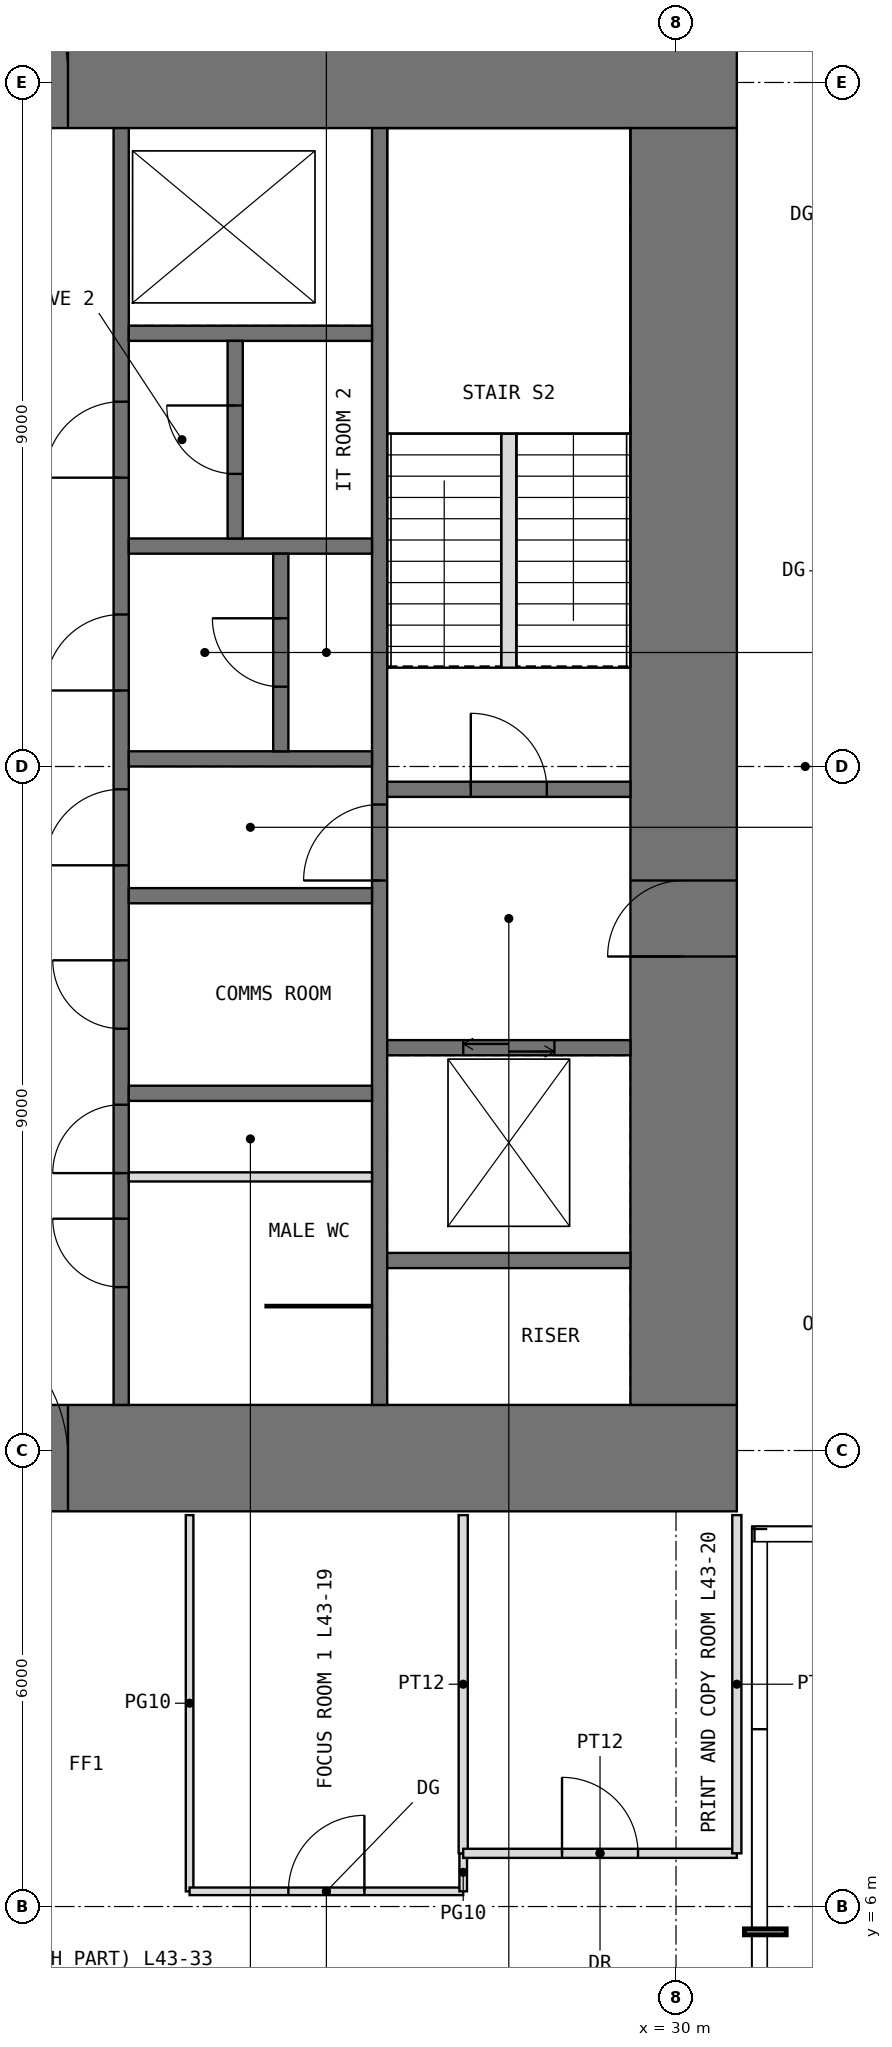
"""IFC4 building model, lengths in metres.
Left out: names, types, materials, properties, quantities, classifications, styles, units other than length and angle.
Written with IfcOpenShell. Run it as: python <this file> out.ifc"""

import sys

from ifc_helpers import new_model, si_unit, direction, frame, frame_2d, origin, place, context, subcontext, project, spatial, rectangle, extrude, element, fill, save


model = new_model("IFC4")
c1 = context("Model", 3, precision=1e-05, world=origin(), true_north=direction((0.0, 1.0)))
c2 = subcontext(c1, "Body", "Model", "MODEL_VIEW")
j1 = project(units=[si_unit("LENGTHUNIT", "METRE"), si_unit("PLANEANGLEUNIT", "RADIAN")], contexts=[c1])
p1 = place(None, origin())
s1 = spatial("IfcSite", under=j1, at=p1, CompositionType="ELEMENT")
p2 = place(p1, origin())
s2 = spatial("IfcBuilding", under=s1, at=p2, CompositionType="ELEMENT")
p3 = place(p2, frame((0.0, 0.0, 182.5)))
s3 = spatial("IfcBuildingStorey", under=s2, at=p3, CompositionType="ELEMENT", Elevation=182.5)
p4 = place(p3, frame((11.2, 11.9, -0.05), z_axis=(0.0, 0.0, 1.0), x_axis=(1.0, 0.0, 0.0)))
e1 = element("IfcWall", 1, at=p4, inside=s3, PredefinedType="SHEAR", context=c2, shape_type="SweptSolid", body=[
    extrude(rectangle(XDim=19.6, YDim=1.4, at=frame_2d((9.8, 0.0))), origin(), (0.0, 0.0, 1.0), 4.0),
])
p5 = place(p4, frame((8.8, 0.0, 0.05)))
e2 = element("IfcOpeningElement", 2, at=p5, cuts=e1, PredefinedType="OPENING", context=c2, shape_type="SweptSolid", body=[
    extrude(rectangle(XDim=2.0, YDim=2.2, at=frame_2d((1.0, 1.1))), frame((0.0, 0.71, 0.0), z_axis=(0.0, -1.0, 0.0), x_axis=(1.0, 0.0, 0.0)), (0.0, 0.0, 1.0), 1.42),
])
p6 = place(p3, frame((11.2, 30.1, -0.05), z_axis=(0.0, 0.0, 1.0), x_axis=(1.0, 0.0, 0.0)))
e3 = element("IfcWall", 3, at=p6, inside=s3, PredefinedType="SHEAR", context=c2, shape_type="SweptSolid", body=[
    extrude(rectangle(XDim=19.6, YDim=1.4, at=frame_2d((9.8, 0.0))), origin(), (0.0, 0.0, 1.0), 4.0),
])
p7 = place(p6, frame((8.8, 0.0, 0.05)))
e4 = element("IfcOpeningElement", 4, at=p7, cuts=e3, PredefinedType="OPENING", context=c2, shape_type="SweptSolid", body=[
    extrude(rectangle(XDim=2.0, YDim=2.2, at=frame_2d((1.0, 1.1))), frame((0.0, 0.71, 0.0), z_axis=(0.0, -1.0, 0.0), x_axis=(1.0, 0.0, 0.0)), (0.0, 0.0, 1.0), 1.42),
])
p8 = place(p3, frame((30.1, 12.6, -0.05), z_axis=(0.0, 0.0, 1.0), x_axis=(0.0, 1.0, 0.0)))
e5 = element("IfcWall", 5, at=p8, inside=s3, PredefinedType="SHEAR", context=c2, shape_type="SweptSolid", body=[
    extrude(rectangle(XDim=16.8, YDim=1.4, at=frame_2d((8.4, 0.0))), origin(), (0.0, 0.0, 1.0), 4.0),
])
p9 = place(p8, frame((5.9, 0.0, 0.05)))
e6 = element("IfcOpeningElement", 6, at=p9, cuts=e5, PredefinedType="OPENING", context=c2, shape_type="SweptSolid", body=[
    extrude(rectangle(XDim=1.0, YDim=2.2, at=frame_2d((0.5, 1.1))), frame((0.0, 0.71, 0.0), z_axis=(0.0, -1.0, 0.0), x_axis=(1.0, 0.0, 0.0)), (0.0, 0.0, 1.0), 1.42),
])
p10 = place(p3, frame((22.7, 12.6, -0.05), z_axis=(0.0, 0.0, 1.0), x_axis=(0.0, 1.0, 0.0)))
e7 = element("IfcWall", 7, at=p10, inside=s3, PredefinedType="SHEAR", context=c2, shape_type="SweptSolid", body=[
    extrude(rectangle(XDim=16.8, YDim=0.2, at=frame_2d((8.4, 0.0))), origin(), (0.0, 0.0, 1.0), 4.0),
])
p11 = place(p10, frame((3.05, 0.0, 0.05)))
e8 = element("IfcOpeningElement", 8, at=p11, cuts=e7, PredefinedType="OPENING", context=c2, shape_type="SweptSolid", body=[
    extrude(rectangle(XDim=0.9, YDim=2.2, at=frame_2d((0.45, 1.1))), frame((0.0, 0.11, 0.0), z_axis=(0.0, -1.0, 0.0), x_axis=(1.0, 0.0, 0.0)), (0.0, 0.0, 1.0), 0.22),
])
p12 = place(p10, frame((7.1, 0.0, 0.05)))
e9 = element("IfcOpeningElement", 9, at=p12, cuts=e7, PredefinedType="OPENING", context=c2, shape_type="SweptSolid", body=[
    extrude(rectangle(XDim=1.0, YDim=2.2, at=frame_2d((0.5, 1.1))), frame((0.0, 0.11, 0.0), z_axis=(0.0, -1.0, 0.0), x_axis=(1.0, 0.0, 0.0)), (0.0, 0.0, 1.0), 0.22),
])
p13 = place(p10, frame((1.55, 0.0, 0.05)))
e10 = element("IfcOpeningElement", 10, at=p13, cuts=e7, PredefinedType="OPENING", context=c2, shape_type="SweptSolid", body=[
    extrude(rectangle(XDim=0.9, YDim=2.2, at=frame_2d((0.45, 1.1))), frame((0.0, 0.11, 0.0), z_axis=(0.0, -1.0, 0.0), x_axis=(1.0, 0.0, 0.0)), (0.0, 0.0, 1.0), 0.22),
])
p14 = place(p10, frame((4.95, 0.0, 0.05)))
e11 = element("IfcOpeningElement", 11, at=p14, cuts=e7, PredefinedType="OPENING", context=c2, shape_type="SweptSolid", body=[
    extrude(rectangle(XDim=0.9, YDim=2.2, at=frame_2d((0.45, 1.1))), frame((0.0, 0.11, 0.0), z_axis=(0.0, -1.0, 0.0), x_axis=(1.0, 0.0, 0.0)), (0.0, 0.0, 1.0), 0.22),
])
p15 = place(p10, frame((9.4, 0.0, 0.05)))
e12 = element("IfcOpeningElement", 12, at=p15, cuts=e7, PredefinedType="OPENING", context=c2, shape_type="SweptSolid", body=[
    extrude(rectangle(XDim=1.0, YDim=2.2, at=frame_2d((0.5, 1.1))), frame((0.0, 0.11, 0.0), z_axis=(0.0, -1.0, 0.0), x_axis=(1.0, 0.0, 0.0)), (0.0, 0.0, 1.0), 0.22),
])
p16 = place(p10, frame((12.2, 0.0, 0.05)))
e13 = element("IfcOpeningElement", 13, at=p16, cuts=e7, PredefinedType="OPENING", context=c2, shape_type="SweptSolid", body=[
    extrude(rectangle(XDim=1.0, YDim=2.2, at=frame_2d((0.5, 1.1))), frame((0.0, 0.11, 0.0), z_axis=(0.0, -1.0, 0.0), x_axis=(1.0, 0.0, 0.0)), (0.0, 0.0, 1.0), 0.22),
])
p17 = place(p3, frame((26.1, 12.6, -0.05), z_axis=(0.0, 0.0, 1.0), x_axis=(0.0, 1.0, 0.0)))
e14 = element("IfcWall", 14, at=p17, inside=s3, PredefinedType="SHEAR", context=c2, shape_type="SweptSolid", body=[
    extrude(rectangle(XDim=16.8, YDim=0.2, at=frame_2d((8.4, 0.0))), origin(), (0.0, 0.0, 1.0), 4.0),
])
p18 = place(p17, frame((6.9, 0.0, 0.05)))
e15 = element("IfcOpeningElement", 15, at=p18, cuts=e14, PredefinedType="OPENING", context=c2, shape_type="SweptSolid", body=[
    extrude(rectangle(XDim=1.0, YDim=2.2, at=frame_2d((0.5, 1.1))), frame((0.0, 0.11, 0.0), z_axis=(0.0, -1.0, 0.0), x_axis=(1.0, 0.0, 0.0)), (0.0, 0.0, 1.0), 0.22),
])
for number, where, z_axis, x_axis in (
    (16, (22.8, 16.7, -0.05), (0.0, 0.0, 1.0), (1.0, 0.0, 0.0)),
    (17, (22.8, 19.3, -0.05), (0.0, 0.0, 1.0), (1.0, 0.0, 0.0)),
    (18, (22.8, 21.1, -0.05), (0.0, 0.0, 1.0), (1.0, 0.0, 0.0)),
    (19, (22.8, 23.9, -0.05), (0.0, 0.0, 1.0), (1.0, 0.0, 0.0)),
    (20, (22.8, 26.7, -0.05), (0.0, 0.0, 1.0), (1.0, 0.0, 0.0)),
    (21, (26.2, 14.5, -0.05), (0.0, 0.0, 1.0), (1.0, 0.0, 0.0)),
):
    element("IfcWall", number, at=place(p3, frame(where, z_axis=z_axis, x_axis=x_axis)), inside=s3, PredefinedType="SHEAR", context=c2, shape_type="SweptSolid", body=[
        extrude(rectangle(XDim=3.2, YDim=0.2, at=frame_2d((1.6, 0.0))), origin(), (0.0, 0.0, 1.0), 4.0),
    ])
p19 = place(p3, frame((26.2, 17.3, -0.05), z_axis=(0.0, 0.0, 1.0), x_axis=(1.0, 0.0, 0.0)))
e22 = element("IfcWall", 22, at=p19, inside=s3, PredefinedType="SHEAR", context=c2, shape_type="SweptSolid", body=[
    extrude(rectangle(XDim=3.2, YDim=0.2, at=frame_2d((1.6, 0.0))), origin(), (0.0, 0.0, 1.0), 4.0),
])
p20 = place(p19, frame((1.0, 0.0, 0.05)))
e23 = element("IfcOpeningElement", 23, at=p20, cuts=e22, PredefinedType="OPENING", context=c2, shape_type="SweptSolid", body=[
    extrude(rectangle(XDim=1.2, YDim=2.2, at=frame_2d((0.6, 1.1))), frame((0.0, 0.11, 0.0), z_axis=(0.0, -1.0, 0.0), x_axis=(1.0, 0.0, 0.0)), (0.0, 0.0, 1.0), 0.22),
])
p21 = place(p3, frame((26.2, 20.7, -0.05), z_axis=(0.0, 0.0, 1.0), x_axis=(1.0, 0.0, 0.0)))
e24 = element("IfcWall", 24, at=p21, inside=s3, PredefinedType="SHEAR", context=c2, shape_type="SweptSolid", body=[
    extrude(rectangle(XDim=3.2, YDim=0.2, at=frame_2d((1.6, 0.0))), origin(), (0.0, 0.0, 1.0), 4.0),
])
p22 = place(p21, frame((1.1, 0.0, 0.05)))
e25 = element("IfcOpeningElement", 25, at=p22, cuts=e24, PredefinedType="OPENING", context=c2, shape_type="SweptSolid", body=[
    extrude(rectangle(XDim=1.0, YDim=2.2, at=frame_2d((0.5, 1.1))), frame((0.0, 0.11, 0.0), z_axis=(0.0, -1.0, 0.0), x_axis=(1.0, 0.0, 0.0)), (0.0, 0.0, 1.0), 0.22),
])
p23 = place(p3, frame((22.8, 15.6, 0.0), z_axis=(0.0, 0.0, 1.0), x_axis=(1.0, 0.0, 0.0)))
e26 = element("IfcWall", 26, at=p23, inside=s3, PredefinedType="PARTITIONING", context=c2, shape_type="SweptSolid", body=[
    extrude(rectangle(XDim=3.2, YDim=0.12, at=frame_2d((1.6, 0.0))), origin(), (0.0, 0.0, 1.0), 3.75),
])
p24 = place(p3, frame((24.6, 13.9, 0.0), z_axis=(0.0, 0.0, 1.0), x_axis=(1.0, 0.0, 0.0)))
e27 = element("IfcWall", 27, at=p24, inside=s3, PredefinedType="PARTITIONING", context=c2, shape_type="SweptSolid", body=[
    extrude(rectangle(XDim=1.4, YDim=0.03, at=frame_2d((0.7, 0.0))), origin(), (0.0, 0.0, 1.0), 3.75),
])
p25 = place(p3, frame((24.8, 21.2, -0.05), z_axis=(0.0, 0.0, 1.0), x_axis=(0.0, 1.0, 0.0)))
e28 = element("IfcWall", 28, at=p25, inside=s3, PredefinedType="SHEAR", context=c2, shape_type="SweptSolid", body=[
    extrude(rectangle(XDim=2.6, YDim=0.2, at=frame_2d((1.3, 0.0))), origin(), (0.0, 0.0, 1.0), 4.0),
])
p26 = place(p25, frame((0.85, 0.0, 0.05)))
e29 = element("IfcOpeningElement", 29, at=p26, cuts=e28, PredefinedType="OPENING", context=c2, shape_type="SweptSolid", body=[
    extrude(rectangle(XDim=0.9, YDim=2.2, at=frame_2d((0.45, 1.1))), frame((0.0, 0.11, 0.0), z_axis=(0.0, -1.0, 0.0), x_axis=(1.0, 0.0, 0.0)), (0.0, 0.0, 1.0), 0.22),
])
p27 = place(p3, frame((24.2, 24.0, -0.05), z_axis=(0.0, 0.0, 1.0), x_axis=(0.0, 1.0, 0.0)))
e30 = element("IfcWall", 30, at=p27, inside=s3, PredefinedType="SHEAR", context=c2, shape_type="SweptSolid", body=[
    extrude(rectangle(XDim=2.6, YDim=0.2, at=frame_2d((1.3, 0.0))), origin(), (0.0, 0.0, 1.0), 4.0),
])
p28 = place(p27, frame((0.85, 0.0, 0.05)))
e31 = element("IfcOpeningElement", 31, at=p28, cuts=e30, PredefinedType="OPENING", context=c2, shape_type="SweptSolid", body=[
    extrude(rectangle(XDim=0.9, YDim=2.2, at=frame_2d((0.45, 1.1))), frame((0.0, 0.11, 0.0), z_axis=(0.0, -1.0, 0.0), x_axis=(1.0, 0.0, 0.0)), (0.0, 0.0, 1.0), 0.22),
])
p29 = place(p3, frame((23.6, 6.2, 0.0), z_axis=(0.0, 0.0, 1.0), x_axis=(0.0, 1.0, 0.0)))
e32 = element("IfcWall", 32, at=p29, inside=s3, PredefinedType="PARTITIONING", context=c2, shape_type="SweptSolid", body=[
    extrude(rectangle(XDim=4.95, YDim=0.1, at=frame_2d((2.475, 0.0))), origin(), (0.0, 0.0, 1.0), 3.75),
])
p30 = place(p3, frame((23.6, 6.2, 0.0), z_axis=(0.0, 0.0, 1.0), x_axis=(1.0, 0.0, 0.0)))
e33 = element("IfcWall", 33, at=p30, inside=s3, PredefinedType="PARTITIONING", context=c2, shape_type="SweptSolid", body=[
    extrude(rectangle(XDim=3.6, YDim=0.1, at=frame_2d((1.8, 0.0))), origin(), (0.0, 0.0, 1.0), 3.75),
])
p31 = place(p30, frame((1.3, 0.0, 0.0)))
e34 = element("IfcOpeningElement", 34, at=p31, cuts=e33, PredefinedType="OPENING", context=c2, shape_type="SweptSolid", body=[
    extrude(rectangle(XDim=1.0, YDim=2.4, at=frame_2d((0.5, 1.2))), frame((0.0, 0.06, 0.0), z_axis=(0.0, -1.0, 0.0), x_axis=(1.0, 0.0, 0.0)), (0.0, 0.0, 1.0), 0.12),
])
p32 = place(p3, frame((27.2, 6.2, 0.0), z_axis=(0.0, 0.0, 1.0), x_axis=(0.0, 1.0, 0.0)))
e35 = element("IfcWall", 35, at=p32, inside=s3, PredefinedType="PARTITIONING", context=c2, shape_type="SweptSolid", body=[
    extrude(rectangle(XDim=0.5, YDim=0.1, at=frame_2d((0.25, 0.0))), origin(), (0.0, 0.0, 1.0), 3.75),
])
p33 = place(p3, frame((27.2, 6.7, 0.0), z_axis=(0.0, 0.0, 1.0), x_axis=(0.0, 1.0, 0.0)))
e36 = element("IfcWall", 36, at=p33, inside=s3, PredefinedType="PARTITIONING", context=c2, shape_type="SweptSolid", body=[
    extrude(rectangle(XDim=4.45, YDim=0.12, at=frame_2d((2.225, 0.0))), origin(), (0.0, 0.0, 1.0), 3.75),
])
p34 = place(p3, frame((27.2, 6.7, 0.0), z_axis=(0.0, 0.0, 1.0), x_axis=(1.0, 0.0, 0.0)))
e37 = element("IfcWall", 37, at=p34, inside=s3, PredefinedType="PARTITIONING", context=c2, shape_type="SweptSolid", body=[
    extrude(rectangle(XDim=3.6, YDim=0.12, at=frame_2d((1.8, 0.0))), origin(), (0.0, 0.0, 1.0), 3.75),
])
p35 = place(p34, frame((1.3, 0.0, 0.0)))
e38 = element("IfcOpeningElement", 38, at=p35, cuts=e37, PredefinedType="OPENING", context=c2, shape_type="SweptSolid", body=[
    extrude(rectangle(XDim=1.0, YDim=2.2, at=frame_2d((0.5, 1.1))), frame((0.0, 0.07, 0.0), z_axis=(0.0, -1.0, 0.0), x_axis=(1.0, 0.0, 0.0)), (0.0, 0.0, 1.0), 0.14),
])
p36 = place(p3, frame((30.8, 6.7, 0.0), z_axis=(0.0, 0.0, 1.0), x_axis=(0.0, 1.0, 0.0)))
e39 = element("IfcWall", 39, at=p36, inside=s3, PredefinedType="PARTITIONING", context=c2, shape_type="SweptSolid", body=[
    extrude(rectangle(XDim=4.45, YDim=0.12, at=frame_2d((2.225, 0.0))), origin(), (0.0, 0.0, 1.0), 3.75),
])
p37 = place(p3, frame((27.8, 22.3, 0.0), z_axis=(0.0, 0.0, 1.0), x_axis=(0.0, 1.0, 0.0)))
e40 = element("IfcWall", 40, at=p37, inside=s3, PredefinedType="PARTITIONING", context=c2, shape_type="SweptSolid", body=[
    extrude(rectangle(XDim=3.08, YDim=0.2, at=frame_2d((1.54, 0.0))), origin(), (0.0, 0.0, 1.0), 4.0),
])
p38 = place(p5, origin())
e41 = element("IfcDoor", 41, at=p38, inside=s3, OperationType="DOUBLE_DOOR_SINGLE_SWING", PredefinedType="DOOR", context=c2, shape_type="SweptSolid", body=[
    extrude(rectangle(XDim=2.0, YDim=2.2, at=frame_2d((1.0, 1.1))), frame((0.0, 0.025, 0.0), z_axis=(0.0, -1.0, 0.0), x_axis=(1.0, 0.0, 0.0)), (0.0, 0.0, 1.0), 0.05),
])
fill(e2, e41)
p39 = place(p7, origin())
e42 = element("IfcDoor", 42, at=p39, inside=s3, OperationType="DOUBLE_DOOR_SINGLE_SWING", PredefinedType="DOOR", context=c2, shape_type="SweptSolid", body=[
    extrude(rectangle(XDim=2.0, YDim=2.2, at=frame_2d((1.0, 1.1))), frame((0.0, 0.025, 0.0), z_axis=(0.0, -1.0, 0.0), x_axis=(1.0, 0.0, 0.0)), (0.0, 0.0, 1.0), 0.05),
])
fill(e4, e42)
p40 = place(p11, origin())
e43 = element("IfcDoor", 43, at=p40, inside=s3, OperationType="SINGLE_SWING_LEFT", PredefinedType="DOOR", context=c2, shape_type="SweptSolid", body=[
    extrude(rectangle(XDim=0.9, YDim=2.2, at=frame_2d((0.45, 1.1))), frame((0.0, 0.025, 0.0), z_axis=(0.0, -1.0, 0.0), x_axis=(1.0, 0.0, 0.0)), (0.0, 0.0, 1.0), 0.05),
])
fill(e8, e43)
p41 = place(p9, origin())
e44 = element("IfcDoor", 44, at=p41, inside=s3, OperationType="SINGLE_SWING_LEFT", PredefinedType="DOOR", context=c2, shape_type="SweptSolid", body=[
    extrude(rectangle(XDim=1.0, YDim=2.2, at=frame_2d((0.5, 1.1))), frame((0.0, 0.025, 0.0), z_axis=(0.0, -1.0, 0.0), x_axis=(1.0, 0.0, 0.0)), (0.0, 0.0, 1.0), 0.05),
])
fill(e6, e44)
p42 = place(p22, origin())
e45 = element("IfcDoor", 45, at=p42, inside=s3, OperationType="SINGLE_SWING_LEFT", PredefinedType="DOOR", context=c2, shape_type="SweptSolid", body=[
    extrude(rectangle(XDim=1.0, YDim=2.2, at=frame_2d((0.5, 1.1))), frame((0.0, 0.025, 0.0), z_axis=(0.0, -1.0, 0.0), x_axis=(1.0, 0.0, 0.0)), (0.0, 0.0, 1.0), 0.05),
])
fill(e25, e45)
p43 = place(p18, origin())
e46 = element("IfcDoor", 46, at=p43, inside=s3, OperationType="SINGLE_SWING_LEFT", PredefinedType="DOOR", context=c2, shape_type="SweptSolid", body=[
    extrude(rectangle(XDim=1.0, YDim=2.2, at=frame_2d((0.5, 1.1))), frame((0.0, 0.025, 0.0), z_axis=(0.0, -1.0, 0.0), x_axis=(1.0, 0.0, 0.0)), (0.0, 0.0, 1.0), 0.05),
])
fill(e15, e46)
p44 = place(p12, origin())
e47 = element("IfcDoor", 47, at=p44, inside=s3, OperationType="SINGLE_SWING_LEFT", PredefinedType="DOOR", context=c2, shape_type="SweptSolid", body=[
    extrude(rectangle(XDim=1.0, YDim=2.2, at=frame_2d((0.5, 1.1))), frame((0.0, 0.025, 0.0), z_axis=(0.0, -1.0, 0.0), x_axis=(1.0, 0.0, 0.0)), (0.0, 0.0, 1.0), 0.05),
])
fill(e9, e47)
p45 = place(p13, origin())
e48 = element("IfcDoor", 48, at=p45, inside=s3, OperationType="SINGLE_SWING_RIGHT", PredefinedType="DOOR", context=c2, shape_type="SweptSolid", body=[
    extrude(rectangle(XDim=0.9, YDim=2.2, at=frame_2d((0.45, 1.1))), frame((0.0, 0.025, 0.0), z_axis=(0.0, -1.0, 0.0), x_axis=(1.0, 0.0, 0.0)), (0.0, 0.0, 1.0), 0.05),
])
fill(e10, e48)
p46 = place(p14, origin())
e49 = element("IfcDoor", 49, at=p46, inside=s3, OperationType="SINGLE_SWING_RIGHT", PredefinedType="DOOR", context=c2, shape_type="SweptSolid", body=[
    extrude(rectangle(XDim=0.9, YDim=2.2, at=frame_2d((0.45, 1.1))), frame((0.0, 0.025, 0.0), z_axis=(0.0, -1.0, 0.0), x_axis=(1.0, 0.0, 0.0)), (0.0, 0.0, 1.0), 0.05),
])
fill(e11, e49)
p47 = place(p15, origin())
e50 = element("IfcDoor", 50, at=p47, inside=s3, OperationType="SINGLE_SWING_LEFT", PredefinedType="DOOR", context=c2, shape_type="SweptSolid", body=[
    extrude(rectangle(XDim=1.0, YDim=2.2, at=frame_2d((0.5, 1.1))), frame((0.0, 0.025, 0.0), z_axis=(0.0, -1.0, 0.0), x_axis=(1.0, 0.0, 0.0)), (0.0, 0.0, 1.0), 0.05),
])
fill(e12, e50)
p48 = place(p26, origin())
e51 = element("IfcDoor", 51, at=p48, inside=s3, OperationType="SINGLE_SWING_RIGHT", PredefinedType="DOOR", context=c2, shape_type="SweptSolid", body=[
    extrude(rectangle(XDim=0.9, YDim=2.2, at=frame_2d((0.45, 1.1))), frame((0.0, 0.025, 0.0), z_axis=(0.0, -1.0, 0.0), x_axis=(1.0, 0.0, 0.0)), (0.0, 0.0, 1.0), 0.05),
])
fill(e29, e51)
p49 = place(p16, origin())
e52 = element("IfcDoor", 52, at=p49, inside=s3, OperationType="SINGLE_SWING_LEFT", PredefinedType="DOOR", context=c2, shape_type="SweptSolid", body=[
    extrude(rectangle(XDim=1.0, YDim=2.2, at=frame_2d((0.5, 1.1))), frame((0.0, 0.025, 0.0), z_axis=(0.0, -1.0, 0.0), x_axis=(1.0, 0.0, 0.0)), (0.0, 0.0, 1.0), 0.05),
])
fill(e13, e52)
p50 = place(p28, origin())
e53 = element("IfcDoor", 53, at=p50, inside=s3, OperationType="SINGLE_SWING_RIGHT", PredefinedType="DOOR", context=c2, shape_type="SweptSolid", body=[
    extrude(rectangle(XDim=0.9, YDim=2.2, at=frame_2d((0.45, 1.1))), frame((0.0, 0.025, 0.0), z_axis=(0.0, -1.0, 0.0), x_axis=(1.0, 0.0, 0.0)), (0.0, 0.0, 1.0), 0.05),
])
fill(e31, e53)
p51 = place(p31, origin())
e54 = element("IfcDoor", 54, at=p51, inside=s3, OperationType="SINGLE_SWING_RIGHT", PredefinedType="DOOR", context=c2, shape_type="SweptSolid", body=[
    extrude(rectangle(XDim=1.0, YDim=2.4, at=frame_2d((0.5, 1.2))), frame((0.0, 0.025, 0.0), z_axis=(0.0, -1.0, 0.0), x_axis=(1.0, 0.0, 0.0)), (0.0, 0.0, 1.0), 0.05),
])
fill(e34, e54)
p52 = place(p35, origin())
e55 = element("IfcDoor", 55, at=p52, inside=s3, OperationType="SINGLE_SWING_LEFT", PredefinedType="DOOR", context=c2, shape_type="SweptSolid", body=[
    extrude(rectangle(XDim=1.0, YDim=2.2, at=frame_2d((0.5, 1.1))), frame((0.0, 0.025, 0.0), z_axis=(0.0, -1.0, 0.0), x_axis=(1.0, 0.0, 0.0)), (0.0, 0.0, 1.0), 0.05),
])
fill(e38, e55)
p53 = place(p20, origin())
e56 = element("IfcDoor", 56, at=p53, inside=s3, OperationType="DOUBLE_DOOR_SLIDING", PredefinedType="DOOR", context=c2, shape_type="SweptSolid", body=[
    extrude(rectangle(XDim=1.2, YDim=2.2, at=frame_2d((0.6, 1.1))), frame((0.0, 0.025, 0.0), z_axis=(0.0, -1.0, 0.0), x_axis=(1.0, 0.0, 0.0)), (0.0, 0.0, 1.0), 0.05),
])
fill(e23, e56)
save(model, sys.argv[1])
